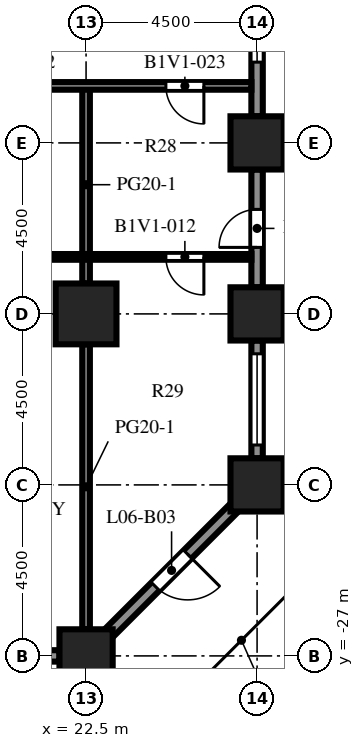
"""IFC4 building model, lengths in metres.
Left out: names, types, materials, properties, quantities, classifications, styles, units other than length and angle.
Written with IfcOpenShell. Run it as: python <this file> out.ifc"""

import sys

from ifc_helpers import new_model, si_unit, direction, frame, frame_2d, origin, origin_2d, place, context, subcontext, project, spatial, rectangle, extrude, element, fill, save


model = new_model("IFC4")
c1 = context("Model", 3, precision=1e-05, world=origin(), true_north=direction((0.0, 1.0)))
c2 = subcontext(c1, "Body", "Model", "MODEL_VIEW")
j1 = project(units=[si_unit("LENGTHUNIT", "METRE"), si_unit("PLANEANGLEUNIT", "RADIAN")], contexts=[c1])
p1 = place(None, origin())
s1 = spatial("IfcSite", under=j1, at=p1, CompositionType="ELEMENT")
p2 = place(p1, origin())
s2 = spatial("IfcBuilding", under=s1, at=p2, CompositionType="ELEMENT")
p3 = place(p2, frame((0.0, 0.0, 27.7)))
s3 = spatial("IfcBuildingStorey", under=s2, at=p3, CompositionType="ELEMENT", Elevation=27.7)
for number, where, z_axis, x_axis in (
    (1, (22.5, -27.0, 0.0), (0.0, 0.0, 1.0), (1.0, 0.0, 0.0)),
    (2, (27.0, -22.5, 0.0), (0.0, 0.0, 1.0), (1.0, 0.0, 0.0)),
    (3, (27.0, -18.0, 0.0), (0.0, 0.0, 1.0), (1.0, 0.0, 0.0)),
    (4, (27.0, -13.5, 0.0), (0.0, 0.0, 1.0), (1.0, 0.0, 0.0)),
):
    element("IfcColumn", number, at=place(p3, frame(where, z_axis=z_axis, x_axis=x_axis)), inside=s3, PredefinedType="COLUMN", context=c2, shape_type="SweptSolid", body=[
        extrude(rectangle(XDim=1.4, YDim=1.4, at=origin_2d()), origin(), (0.0, 0.0, 1.0), 4.1),
    ])
p4 = place(p3, frame((22.5, -18.0, 0.0), z_axis=(0.0, 0.0, 1.0), x_axis=(1.0, 0.0, 0.0)))
e5 = element("IfcColumn", 5, at=p4, inside=s3, PredefinedType="COLUMN", context=c2, shape_type="SweptSolid", body=[
    extrude(rectangle(XDim=1.6, YDim=1.6, at=origin_2d()), origin(), (0.0, 0.0, 1.0), 4.1),
])
p5 = place(p3, frame((21.8, -27.0, 0.0), z_axis=(0.0, 0.0, 1.0), x_axis=(-1.0, 0.0, 0.0)))
e6 = element("IfcWall", 6, at=p5, inside=s3, PredefinedType="SOLIDWALL", context=c2, shape_type="SweptSolid", body=[
    extrude(rectangle(XDim=3.1, YDim=0.3, at=frame_2d((1.55, 0.0))), origin(), (0.0, 0.0, 1.0), 2.75),
])
p6 = place(p5, frame((0.35, 0.0, 0.8)))
e7 = element("IfcOpeningElement", 7, at=p6, cuts=e6, PredefinedType="OPENING", context=c2, shape_type="SweptSolid", body=[
    extrude(rectangle(XDim=2.4, YDim=1.7, at=frame_2d((1.2, 0.85))), frame((0.0, 0.16, 0.0), z_axis=(0.0, -1.0, 0.0), x_axis=(1.0, 0.0, 0.0)), (0.0, 0.0, 1.0), 0.32),
])
p7 = place(p3, frame((26.406, -23.094, 0.0), z_axis=(0.0, 0.0, 1.0), x_axis=(-0.707106781187, -0.707106781187, 0.0)))
e8 = element("IfcWall", 8, at=p7, inside=s3, PredefinedType="SOLIDWALL", context=c2, shape_type="SweptSolid", body=[
    extrude(rectangle(XDim=4.684, YDim=0.3, at=frame_2d((2.342, 0.0))), origin(), (0.0, 0.0, 1.0), 2.75),
])
p8 = place(p7, frame((1.742, 0.0, 0.0)))
e9 = element("IfcOpeningElement", 9, at=p8, cuts=e8, PredefinedType="OPENING", context=c2, shape_type="SweptSolid", body=[
    extrude(rectangle(XDim=1.2, YDim=2.2, at=frame_2d((0.6, 1.1))), frame((0.0, 0.16, 0.0), z_axis=(0.0, -1.0, 0.0), x_axis=(1.0, 0.0, 0.0)), (0.0, 0.0, 1.0), 0.32),
])
p9 = place(p3, frame((27.0, -18.7, 0.0), z_axis=(0.0, 0.0, 1.0), x_axis=(0.0, -1.0, 0.0)))
e10 = element("IfcWall", 10, at=p9, inside=s3, PredefinedType="SOLIDWALL", context=c2, shape_type="SweptSolid", body=[
    extrude(rectangle(XDim=3.1, YDim=0.3, at=frame_2d((1.55, 0.0))), origin(), (0.0, 0.0, 1.0), 2.75),
])
p10 = place(p9, frame((0.35, 0.0, 0.8)))
e11 = element("IfcOpeningElement", 11, at=p10, cuts=e10, PredefinedType="OPENING", context=c2, shape_type="SweptSolid", body=[
    extrude(rectangle(XDim=2.4, YDim=1.7, at=frame_2d((1.2, 0.85))), frame((0.0, 0.16, 0.0), z_axis=(0.0, -1.0, 0.0), x_axis=(1.0, 0.0, 0.0)), (0.0, 0.0, 1.0), 0.32),
])
p11 = place(p3, frame((27.0, -14.2, 0.0), z_axis=(0.0, 0.0, 1.0), x_axis=(0.0, -1.0, 0.0)))
e12 = element("IfcWall", 12, at=p11, inside=s3, PredefinedType="SOLIDWALL", context=c2, shape_type="SweptSolid", body=[
    extrude(rectangle(XDim=3.1, YDim=0.3, at=frame_2d((1.55, 0.0))), origin(), (0.0, 0.0, 1.0), 2.75),
])
p12 = place(p11, frame((1.05, 0.0, 0.0)))
e13 = element("IfcOpeningElement", 13, at=p12, cuts=e12, PredefinedType="OPENING", context=c2, shape_type="SweptSolid", body=[
    extrude(rectangle(XDim=1.0, YDim=2.2, at=frame_2d((0.5, 1.1))), frame((0.0, 0.16, 0.0), z_axis=(0.0, -1.0, 0.0), x_axis=(1.0, 0.0, 0.0)), (0.0, 0.0, 1.0), 0.32),
])
p13 = place(p3, frame((27.0, -9.7, 0.0), z_axis=(0.0, 0.0, 1.0), x_axis=(0.0, -1.0, 0.0)))
e14 = element("IfcWall", 14, at=p13, inside=s3, PredefinedType="SOLIDWALL", context=c2, shape_type="SweptSolid", body=[
    extrude(rectangle(XDim=3.1, YDim=0.3, at=frame_2d((1.55, 0.0))), origin(), (0.0, 0.0, 1.0), 2.75),
])
p14 = place(p13, frame((0.475, 0.0, 0.8)))
e15 = element("IfcOpeningElement", 15, at=p14, cuts=e14, PredefinedType="OPENING", context=c2, shape_type="SweptSolid", body=[
    extrude(rectangle(XDim=1.2, YDim=1.7, at=frame_2d((0.6, 0.85))), frame((0.0, 0.16, 0.0), z_axis=(0.0, -1.0, 0.0), x_axis=(1.0, 0.0, 0.0)), (0.0, 0.0, 1.0), 0.32),
])
p15 = place(p3, frame((22.5, -26.3, 0.0), z_axis=(0.0, 0.0, 1.0), x_axis=(0.0, 1.0, 0.0)))
e16 = element("IfcWall", 16, at=p15, inside=s3, PredefinedType="PARTITIONING", context=c2, shape_type="SweptSolid", body=[
    extrude(rectangle(XDim=7.5, YDim=0.2, at=frame_2d((3.75, 0.0))), origin(), (0.0, 0.0, 1.0), 3.65),
])
p16 = place(p3, frame((22.5, -17.2, 0.0), z_axis=(0.0, 0.0, 1.0), x_axis=(0.0, 1.0, 0.0)))
e17 = element("IfcWall", 17, at=p16, inside=s3, PredefinedType="PARTITIONING", context=c2, shape_type="SweptSolid", body=[
    extrude(rectangle(XDim=5.2, YDim=0.2, at=frame_2d((2.6, 0.0))), origin(), (0.0, 0.0, 1.0), 3.65),
])
p17 = place(p3, frame((26.85, -16.5, 0.0), z_axis=(0.0, 0.0, 1.0), x_axis=(-1.0, 0.0, 0.0)))
e18 = element("IfcWall", 18, at=p17, inside=s3, PredefinedType="PARTITIONING", context=c2, shape_type="SweptSolid", body=[
    extrude(rectangle(XDim=53.7, YDim=0.15, at=frame_2d((26.85, 0.0))), origin(), (0.0, 0.0, 1.0), 3.65),
])
p18 = place(p17, frame((50.75, 0.0, 0.0)))
e19 = element("IfcOpeningElement", 19, at=p18, cuts=e18, PredefinedType="OPENING", context=c2, shape_type="SweptSolid", body=[
    extrude(rectangle(XDim=1.0, YDim=2.1, at=frame_2d((0.5, 1.05))), frame((0.0, 0.085, 0.0), z_axis=(0.0, -1.0, 0.0), x_axis=(1.0, 0.0, 0.0)), (0.0, 0.0, 1.0), 0.17),
])
p19 = place(p17, frame((45.75, 0.0, 0.0)))
e20 = element("IfcOpeningElement", 20, at=p19, cuts=e18, PredefinedType="OPENING", context=c2, shape_type="SweptSolid", body=[
    extrude(rectangle(XDim=1.0, YDim=2.1, at=frame_2d((0.5, 1.05))), frame((0.0, 0.085, 0.0), z_axis=(0.0, -1.0, 0.0), x_axis=(1.0, 0.0, 0.0)), (0.0, 0.0, 1.0), 0.17),
])
p20 = place(p17, frame((37.75, 0.0, 0.0)))
e21 = element("IfcOpeningElement", 21, at=p20, cuts=e18, PredefinedType="OPENING", context=c2, shape_type="SweptSolid", body=[
    extrude(rectangle(XDim=1.0, YDim=2.1, at=frame_2d((0.5, 1.05))), frame((0.0, 0.085, 0.0), z_axis=(0.0, -1.0, 0.0), x_axis=(1.0, 0.0, 0.0)), (0.0, 0.0, 1.0), 0.17),
])
p21 = place(p17, frame((28.25, 0.0, 0.0)))
e22 = element("IfcOpeningElement", 22, at=p21, cuts=e18, PredefinedType="OPENING", context=c2, shape_type="SweptSolid", body=[
    extrude(rectangle(XDim=1.0, YDim=2.1, at=frame_2d((0.5, 1.05))), frame((0.0, 0.085, 0.0), z_axis=(0.0, -1.0, 0.0), x_axis=(1.0, 0.0, 0.0)), (0.0, 0.0, 1.0), 0.17),
])
p22 = place(p17, frame((19.75, 0.0, 0.0)))
e23 = element("IfcOpeningElement", 23, at=p22, cuts=e18, PredefinedType="OPENING", context=c2, shape_type="SweptSolid", body=[
    extrude(rectangle(XDim=1.0, YDim=2.1, at=frame_2d((0.5, 1.05))), frame((0.0, 0.085, 0.0), z_axis=(0.0, -1.0, 0.0), x_axis=(1.0, 0.0, 0.0)), (0.0, 0.0, 1.0), 0.17),
])
p23 = place(p17, frame((13.5, 0.0, 0.0)))
e24 = element("IfcOpeningElement", 24, at=p23, cuts=e18, PredefinedType="OPENING", context=c2, shape_type="SweptSolid", body=[
    extrude(rectangle(XDim=1.0, YDim=2.1, at=frame_2d((0.5, 1.05))), frame((0.0, 0.085, 0.0), z_axis=(0.0, -1.0, 0.0), x_axis=(1.0, 0.0, 0.0)), (0.0, 0.0, 1.0), 0.17),
])
p24 = place(p17, frame((6.75, 0.0, 0.0)))
e25 = element("IfcOpeningElement", 25, at=p24, cuts=e18, PredefinedType="OPENING", context=c2, shape_type="SweptSolid", body=[
    extrude(rectangle(XDim=1.0, YDim=2.1, at=frame_2d((0.5, 1.05))), frame((0.0, 0.085, 0.0), z_axis=(0.0, -1.0, 0.0), x_axis=(1.0, 0.0, 0.0)), (0.0, 0.0, 1.0), 0.17),
])
p25 = place(p17, frame((1.25, 0.0, 0.0)))
e26 = element("IfcOpeningElement", 26, at=p25, cuts=e18, PredefinedType="OPENING", context=c2, shape_type="SweptSolid", body=[
    extrude(rectangle(XDim=1.0, YDim=2.1, at=frame_2d((0.5, 1.05))), frame((0.0, 0.085, 0.0), z_axis=(0.0, -1.0, 0.0), x_axis=(1.0, 0.0, 0.0)), (0.0, 0.0, 1.0), 0.17),
])
p26 = place(p3, frame((26.85, -12.0, 0.0), z_axis=(0.0, 0.0, 1.0), x_axis=(-1.0, 0.0, 0.0)))
e27 = element("IfcWall", 27, at=p26, inside=s3, PredefinedType="PARTITIONING", context=c2, shape_type="SweptSolid", body=[
    extrude(rectangle(XDim=53.7, YDim=0.2, at=frame_2d((26.85, 0.0))), origin(), (0.0, 0.0, 1.0), 3.65),
])
p27 = place(p26, frame((51.5, 0.0, 0.0)))
e28 = element("IfcOpeningElement", 28, at=p27, cuts=e27, PredefinedType="OPENING", context=c2, shape_type="SweptSolid", body=[
    extrude(rectangle(XDim=1.0, YDim=2.1, at=frame_2d((0.5, 1.05))), frame((0.0, 0.11, 0.0), z_axis=(0.0, -1.0, 0.0), x_axis=(1.0, 0.0, 0.0)), (0.0, 0.0, 1.0), 0.22),
])
p28 = place(p26, frame((44.0, 0.0, 0.0)))
e29 = element("IfcOpeningElement", 29, at=p28, cuts=e27, PredefinedType="OPENING", context=c2, shape_type="SweptSolid", body=[
    extrude(rectangle(XDim=1.0, YDim=2.1, at=frame_2d((0.5, 1.05))), frame((0.0, 0.11, 0.0), z_axis=(0.0, -1.0, 0.0), x_axis=(1.0, 0.0, 0.0)), (0.0, 0.0, 1.0), 0.22),
])
p29 = place(p26, frame((37.25, 0.0, 0.0)))
e30 = element("IfcOpeningElement", 30, at=p29, cuts=e27, PredefinedType="OPENING", context=c2, shape_type="SweptSolid", body=[
    extrude(rectangle(XDim=1.0, YDim=2.1, at=frame_2d((0.5, 1.05))), frame((0.0, 0.11, 0.0), z_axis=(0.0, -1.0, 0.0), x_axis=(1.0, 0.0, 0.0)), (0.0, 0.0, 1.0), 0.22),
])
p30 = place(p26, frame((30.5, 0.0, 0.0)))
e31 = element("IfcOpeningElement", 31, at=p30, cuts=e27, PredefinedType="OPENING", context=c2, shape_type="SweptSolid", body=[
    extrude(rectangle(XDim=1.0, YDim=2.1, at=frame_2d((0.5, 1.05))), frame((0.0, 0.11, 0.0), z_axis=(0.0, -1.0, 0.0), x_axis=(1.0, 0.0, 0.0)), (0.0, 0.0, 1.0), 0.22),
])
p31 = place(p26, frame((20.0, 0.0, 0.0)))
e32 = element("IfcOpeningElement", 32, at=p31, cuts=e27, PredefinedType="OPENING", context=c2, shape_type="SweptSolid", body=[
    extrude(rectangle(XDim=1.0, YDim=2.1, at=frame_2d((0.5, 1.05))), frame((0.0, 0.11, 0.0), z_axis=(0.0, -1.0, 0.0), x_axis=(1.0, 0.0, 0.0)), (0.0, 0.0, 1.0), 0.22),
])
p32 = place(p26, frame((13.0, 0.0, 0.0)))
e33 = element("IfcOpeningElement", 33, at=p32, cuts=e27, PredefinedType="OPENING", context=c2, shape_type="SweptSolid", body=[
    extrude(rectangle(XDim=1.0, YDim=2.1, at=frame_2d((0.5, 1.05))), frame((0.0, 0.11, 0.0), z_axis=(0.0, -1.0, 0.0), x_axis=(1.0, 0.0, 0.0)), (0.0, 0.0, 1.0), 0.22),
])
p33 = place(p26, frame((5.75, 0.0, 0.0)))
e34 = element("IfcOpeningElement", 34, at=p33, cuts=e27, PredefinedType="OPENING", context=c2, shape_type="SweptSolid", body=[
    extrude(rectangle(XDim=1.0, YDim=2.1, at=frame_2d((0.5, 1.05))), frame((0.0, 0.11, 0.0), z_axis=(0.0, -1.0, 0.0), x_axis=(1.0, 0.0, 0.0)), (0.0, 0.0, 1.0), 0.22),
])
p34 = place(p26, frame((1.25, 0.0, 0.0)))
e35 = element("IfcOpeningElement", 35, at=p34, cuts=e27, PredefinedType="OPENING", context=c2, shape_type="SweptSolid", body=[
    extrude(rectangle(XDim=1.0, YDim=2.1, at=frame_2d((0.5, 1.05))), frame((0.0, 0.11, 0.0), z_axis=(0.0, -1.0, 0.0), x_axis=(1.0, 0.0, 0.0)), (0.0, 0.0, 1.0), 0.22),
])
p35 = place(p8, origin())
e36 = element("IfcDoor", 36, at=p35, inside=s3, OperationType="SINGLE_SWING_LEFT", PredefinedType="DOOR", context=c2, shape_type="SweptSolid", body=[
    extrude(rectangle(XDim=1.2, YDim=2.2, at=frame_2d((0.6, 1.1))), frame((0.0, 0.025, 0.0), z_axis=(0.0, -1.0, 0.0), x_axis=(1.0, 0.0, 0.0)), (0.0, 0.0, 1.0), 0.05),
])
fill(e9, e36)
p36 = place(p10, origin())
e37 = element("IfcWindow", 37, at=p36, inside=s3, PartitioningType="SINGLE_PANEL", PredefinedType="WINDOW", context=c2, shape_type="SweptSolid", body=[
    extrude(rectangle(XDim=2.4, YDim=1.7, at=frame_2d((1.2, 0.85))), frame((0.0, 0.03, 0.0), z_axis=(0.0, -1.0, 0.0), x_axis=(1.0, 0.0, 0.0)), (0.0, 0.0, 1.0), 0.06),
])
fill(e11, e37)
p37 = place(p12, origin())
e38 = element("IfcDoor", 38, at=p37, inside=s3, OperationType="SINGLE_SWING_RIGHT", PredefinedType="DOOR", context=c2, shape_type="SweptSolid", body=[
    extrude(rectangle(XDim=1.0, YDim=2.2, at=frame_2d((0.5, 1.1))), frame((0.0, 0.025, 0.0), z_axis=(0.0, -1.0, 0.0), x_axis=(1.0, 0.0, 0.0)), (0.0, 0.0, 1.0), 0.05),
])
fill(e13, e38)
p38 = place(p14, origin())
e39 = element("IfcWindow", 39, at=p38, inside=s3, PartitioningType="SINGLE_PANEL", PredefinedType="WINDOW", context=c2, shape_type="SweptSolid", body=[
    extrude(rectangle(XDim=1.2, YDim=1.7, at=frame_2d((0.6, 0.85))), frame((0.0, 0.03, 0.0), z_axis=(0.0, -1.0, 0.0), x_axis=(1.0, 0.0, 0.0)), (0.0, 0.0, 1.0), 0.06),
])
fill(e15, e39)
p39 = place(p25, origin())
e40 = element("IfcDoor", 40, at=p39, inside=s3, OperationType="SINGLE_SWING_LEFT", PredefinedType="DOOR", context=c2, shape_type="SweptSolid", body=[
    extrude(rectangle(XDim=1.0, YDim=2.1, at=frame_2d((0.5, 1.05))), frame((0.0, 0.025, 0.0), z_axis=(0.0, -1.0, 0.0), x_axis=(1.0, 0.0, 0.0)), (0.0, 0.0, 1.0), 0.05),
])
fill(e26, e40)
p40 = place(p34, origin())
e41 = element("IfcDoor", 41, at=p40, inside=s3, OperationType="SINGLE_SWING_LEFT", PredefinedType="DOOR", context=c2, shape_type="SweptSolid", body=[
    extrude(rectangle(XDim=1.0, YDim=2.1, at=frame_2d((0.5, 1.05))), frame((0.0, 0.025, 0.0), z_axis=(0.0, -1.0, 0.0), x_axis=(1.0, 0.0, 0.0)), (0.0, 0.0, 1.0), 0.05),
])
fill(e35, e41)
save(model, sys.argv[1])
